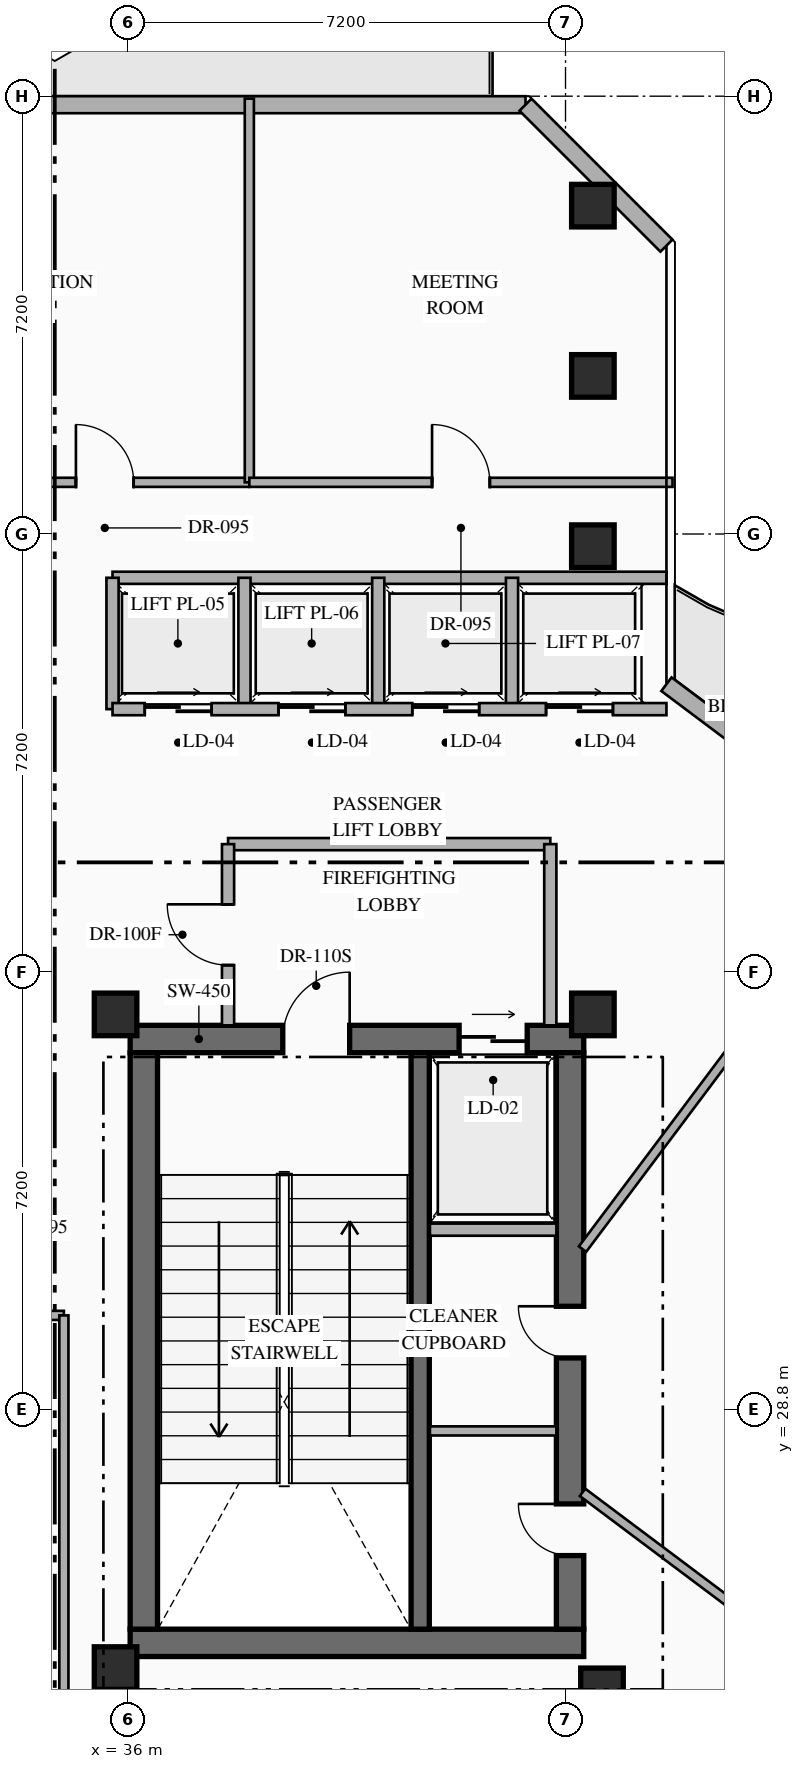
"""IFC4 building model, lengths in metres.
Left out: names, types, materials, properties, quantities, classifications, styles, units other than length and angle.
Written with IfcOpenShell. Run it as: python <this file> out.ifc"""

import sys

from ifc_helpers import new_model, si_unit, direction, frame, frame_2d, origin, origin_2d, place, context, subcontext, project, spatial, rectangle, hollow_rectangle, extrude, element, fill, save


model = new_model("IFC4")
c1 = context("Model", 3, precision=1e-05, world=origin(), true_north=direction((0.0, 1.0)))
c2 = subcontext(c1, "Body", "Model", "MODEL_VIEW")
j1 = project(units=[si_unit("LENGTHUNIT", "METRE"), si_unit("PLANEANGLEUNIT", "RADIAN")], contexts=[c1])
p1 = place(None, origin())
s1 = spatial("IfcSite", under=j1, at=p1, CompositionType="ELEMENT")
p2 = place(p1, origin())
s2 = spatial("IfcBuilding", under=s1, at=p2, CompositionType="ELEMENT")
p3 = place(p2, frame((0.0, 0.0, 234.75)))
s3 = spatial("IfcBuildingStorey", under=s2, at=p3, CompositionType="ELEMENT", Elevation=234.75)
p4 = place(p3, frame((36.04, 24.965, 0.0), z_axis=(0.0, 0.0, 1.0), x_axis=(1.0, 0.0, 0.0)))
e1 = element("IfcWall", 1, at=p4, inside=s3, PredefinedType="SHEAR", context=c2, shape_type="SweptSolid", body=[
    extrude(rectangle(XDim=7.46, YDim=0.45, at=frame_2d((3.73, 0.0))), origin(), (0.0, 0.0, 1.0), 4.8),
])
p5 = place(p3, frame((36.04, 34.895, 0.0), z_axis=(0.0, 0.0, 1.0), x_axis=(1.0, 0.0, 0.0)))
e2 = element("IfcWall", 2, at=p5, inside=s3, PredefinedType="SHEAR", context=c2, shape_type="SweptSolid", body=[
    extrude(rectangle(XDim=7.46, YDim=0.45, at=frame_2d((3.73, 0.0))), origin(), (0.0, 0.0, 1.0), 4.8),
])
p6 = place(p5, frame((2.51, 0.0, 0.0)))
e3 = element("IfcOpeningElement", 3, at=p6, cuts=e2, PredefinedType="OPENING", context=c2, shape_type="SweptSolid", body=[
    extrude(rectangle(XDim=1.1, YDim=2.2, at=frame_2d((0.55, 1.1))), frame((0.0, 0.235, 0.0), z_axis=(0.0, -1.0, 0.0), x_axis=(1.0, 0.0, 0.0)), (0.0, 0.0, 1.0), 0.47),
])
p7 = place(p5, frame((5.41, 0.0, 0.0)))
e4 = element("IfcOpeningElement", 4, at=p7, cuts=e2, PredefinedType="OPENING", context=c2, shape_type="SweptSolid", body=[
    extrude(rectangle(XDim=1.12, YDim=2.15, at=frame_2d((0.56, 1.075))), frame((0.0, 0.235, 0.0), z_axis=(0.0, -1.0, 0.0), x_axis=(1.0, 0.0, 0.0)), (0.0, 0.0, 1.0), 0.47),
])
p8 = place(p3, frame((36.265, 25.19, 0.0), z_axis=(0.0, 0.0, 1.0), x_axis=(0.0, 1.0, 0.0)))
e5 = element("IfcWall", 5, at=p8, inside=s3, PredefinedType="SHEAR", context=c2, shape_type="SweptSolid", body=[
    extrude(rectangle(XDim=9.48, YDim=0.45, at=frame_2d((4.74, 0.0))), origin(), (0.0, 0.0, 1.0), 4.8),
])
p9 = place(p3, frame((43.275, 25.19, 0.0), z_axis=(0.0, 0.0, 1.0), x_axis=(0.0, 1.0, 0.0)))
e6 = element("IfcWall", 6, at=p9, inside=s3, PredefinedType="SHEAR", context=c2, shape_type="SweptSolid", body=[
    extrude(rectangle(XDim=9.48, YDim=0.45, at=frame_2d((4.74, 0.0))), origin(), (0.0, 0.0, 1.0), 4.8),
])
p10 = place(p9, frame((1.21, 0.0, 0.0)))
e7 = element("IfcOpeningElement", 7, at=p10, cuts=e6, PredefinedType="OPENING", context=c2, shape_type="SweptSolid", body=[
    extrude(rectangle(XDim=0.85, YDim=2.08, at=frame_2d((0.425, 1.04))), frame((0.0, 0.235, 0.0), z_axis=(0.0, -1.0, 0.0), x_axis=(1.0, 0.0, 0.0)), (0.0, 0.0, 1.0), 0.47),
])
p11 = place(p9, frame((4.46, 0.0, 0.0)))
e8 = element("IfcOpeningElement", 8, at=p11, cuts=e6, PredefinedType="OPENING", context=c2, shape_type="SweptSolid", body=[
    extrude(rectangle(XDim=0.85, YDim=2.08, at=frame_2d((0.425, 1.04))), frame((0.0, 0.235, 0.0), z_axis=(0.0, -1.0, 0.0), x_axis=(1.0, 0.0, 0.0)), (0.0, 0.0, 1.0), 0.47),
])
p12 = place(p3, frame((40.81, 25.19, 0.0), z_axis=(0.0, 0.0, 1.0), x_axis=(0.0, 1.0, 0.0)))
e9 = element("IfcWall", 9, at=p12, inside=s3, PredefinedType="SHEAR", context=c2, shape_type="SweptSolid", body=[
    extrude(rectangle(XDim=9.48, YDim=0.3, at=frame_2d((4.74, 0.0))), origin(), (0.0, 0.0, 1.0), 4.8),
])
for number, where, z_axis, x_axis in (
    (10, (35.8, 24.55, 0.0), (0.0, 0.0, 1.0), (1.0, 0.0, 0.0)),
    (11, (43.8, 24.2, 0.0), (0.0, 0.0, 1.0), (1.0, 0.0, 0.0)),
    (12, (35.8, 35.3, 0.0), (0.0, 0.0, 1.0), (1.0, 0.0, 0.0)),
    (13, (43.65, 35.3, 0.0), (0.0, 0.0, 1.0), (1.0, 0.0, 0.0)),
    (14, (43.65, 43.0, 0.0), (0.0, 0.0, 1.0), (1.0, 0.0, 0.0)),
    (15, (43.65, 45.8, 0.0), (0.0, 0.0, 1.0), (1.0, 0.0, 0.0)),
    (16, (43.65, 48.6, 0.0), (0.0, 0.0, 1.0), (1.0, 0.0, 0.0)),
):
    element("IfcColumn", number, at=place(p3, frame(where, z_axis=z_axis, x_axis=x_axis)), inside=s3, PredefinedType="COLUMN", context=c2, shape_type="SweptSolid", body=[
        extrude(hollow_rectangle(XDim=0.7, YDim=0.7, WallThickness=0.028, at=origin_2d()), origin(), (0.0, 0.0, 1.0), 4.8),
    ])
p13 = place(p3, frame((44.86, 40.73, 0.0), z_axis=(0.0, 0.0, 1.0), x_axis=(0.800022950109, -0.599969398635, 0.0)))
e17 = element("IfcWall", 17, at=p13, inside=s3, PredefinedType="STANDARD", context=c2, shape_type="SweptSolid", body=[
    extrude(rectangle(XDim=10.212, YDim=0.28, at=frame_2d((5.106, 0.0))), origin(), (0.0, 0.0, 1.0), 4.55),
])
p14 = place(p13, frame((1.901, 0.0, 0.0)))
e18 = element("IfcOpeningElement", 18, at=p14, cuts=e17, PredefinedType="OPENING", context=c2, shape_type="SweptSolid", body=[
    extrude(rectangle(XDim=1.1, YDim=2.2, at=frame_2d((0.55, 1.1))), frame((0.0, 0.15, 0.0), z_axis=(0.0, -1.0, 0.0), x_axis=(1.0, 0.0, 0.0)), (0.0, 0.0, 1.0), 0.3),
])
p15 = place(p3, frame((53.493, 31.358, 0.0), z_axis=(0.0, 0.0, 1.0), x_axis=(-0.599970072971, -0.800022444397, 0.0)))
e19 = element("IfcWall", 19, at=p15, inside=s3, PredefinedType="STANDARD", context=c2, shape_type="SweptSolid", body=[
    extrude(rectangle(XDim=20.885, YDim=0.28, at=frame_2d((10.442, 0.0))), origin(), (0.0, 0.0, 1.0), 4.55),
])
p16 = place(p15, frame((16.181, 0.0, 0.0)))
e20 = element("IfcOpeningElement", 20, at=p16, cuts=e19, PredefinedType="OPENING", context=c2, shape_type="SweptSolid", body=[
    extrude(rectangle(XDim=1.8, YDim=2.25, at=frame_2d((0.9, 1.125))), frame((0.0, 0.15, 0.0), z_axis=(0.0, -1.0, 0.0), x_axis=(1.0, 0.0, 0.0)), (0.0, 0.0, 1.0), 0.3),
])
p17 = place(p15, frame((1.456, 0.0, 0.75)))
e21 = element("IfcOpeningElement", 21, at=p17, cuts=e19, PredefinedType="OPENING", context=c2, shape_type="SweptSolid", body=[
    extrude(rectangle(XDim=2.1, YDim=2.2, at=frame_2d((1.05, 1.1))), frame((0.0, 0.15, 0.0), z_axis=(0.0, -1.0, 0.0), x_axis=(1.0, 0.0, 0.0)), (0.0, 0.0, 1.0), 0.3),
])
p18 = place(p3, frame((20.458, 50.26, 0.0), z_axis=(0.0, 0.0, 1.0), x_axis=(1.0, 0.0, 0.0)))
e22 = element("IfcWall", 22, at=p18, inside=s3, PredefinedType="STANDARD", context=c2, shape_type="SweptSolid", body=[
    extrude(rectangle(XDim=22.084, YDim=0.28, at=frame_2d((11.042, 0.0))), origin(), (0.0, 0.0, 1.0), 4.55),
])
p19 = place(p18, frame((2.1, 0.0, 0.0)))
e23 = element("IfcOpeningElement", 23, at=p19, cuts=e22, PredefinedType="OPENING", context=c2, shape_type="SweptSolid", body=[
    extrude(rectangle(XDim=1.1, YDim=2.2, at=frame_2d((0.55, 1.1))), frame((0.0, 0.15, 0.0), z_axis=(0.0, -1.0, 0.0), x_axis=(1.0, 0.0, 0.0)), (0.0, 0.0, 1.0), 0.3),
])
p20 = place(p3, frame((42.542, 50.26, 0.0), z_axis=(0.0, 0.0, 1.0), x_axis=(0.707106781187, -0.707106781187, 0.0)))
e24 = element("IfcWall", 24, at=p20, inside=s3, PredefinedType="STANDARD", context=c2, shape_type="SweptSolid", body=[
    extrude(rectangle(XDim=3.278, YDim=0.28, at=frame_2d((1.639, 0.0))), origin(), (0.0, 0.0, 1.0), 4.55),
])
p21 = place(p3, frame((40.97, 31.76, 0.0), z_axis=(0.0, 0.0, 1.0), x_axis=(1.0, 0.0, 0.0)))
e25 = element("IfcWall", 25, at=p21, inside=s3, PredefinedType="STANDARD", context=c2, shape_type="SweptSolid", body=[
    extrude(rectangle(XDim=2.08, YDim=0.2, at=frame_2d((1.04, 0.0))), origin(), (0.0, 0.0, 1.0), 4.55),
])
p22 = place(p3, frame((40.97, 28.45, 0.0), z_axis=(0.0, 0.0, 1.0), x_axis=(1.0, 0.0, 0.0)))
e26 = element("IfcWall", 26, at=p22, inside=s3, PredefinedType="PARTITIONING", context=c2, shape_type="SweptSolid", body=[
    extrude(rectangle(XDim=2.08, YDim=0.15, at=frame_2d((1.04, 0.0))), origin(), (0.0, 0.0, 1.0), 4.55),
])
p23 = place(p3, frame((37.65, 38.1, 0.0), z_axis=(0.0, 0.0, 1.0), x_axis=(1.0, 0.0, 0.0)))
e27 = element("IfcWall", 27, at=p23, inside=s3, PredefinedType="STANDARD", context=c2, shape_type="SweptSolid", body=[
    extrude(rectangle(XDim=5.3, YDim=0.2, at=frame_2d((2.65, 0.0))), origin(), (0.0, 0.0, 1.0), 4.55),
])
p24 = place(p3, frame((42.95, 35.12, 0.0), z_axis=(0.0, 0.0, 1.0), x_axis=(0.0, 1.0, 0.0)))
e28 = element("IfcWall", 28, at=p24, inside=s3, PredefinedType="STANDARD", context=c2, shape_type="SweptSolid", body=[
    extrude(rectangle(XDim=2.98, YDim=0.2, at=frame_2d((1.49, 0.0))), origin(), (0.0, 0.0, 1.0), 4.55),
])
p25 = place(p3, frame((37.65, 35.12, 0.0), z_axis=(0.0, 0.0, 1.0), x_axis=(0.0, 1.0, 0.0)))
e29 = element("IfcWall", 29, at=p25, inside=s3, PredefinedType="STANDARD", context=c2, shape_type="SweptSolid", body=[
    extrude(rectangle(XDim=2.98, YDim=0.2, at=frame_2d((1.49, 0.0))), origin(), (0.0, 0.0, 1.0), 4.55),
])
p26 = place(p25, frame((0.99, 0.0, 0.0)))
e30 = element("IfcOpeningElement", 30, at=p26, cuts=e29, PredefinedType="OPENING", context=c2, shape_type="SweptSolid", body=[
    extrude(rectangle(XDim=1.0, YDim=2.2, at=frame_2d((0.5, 1.1))), frame((0.0, 0.11, 0.0), z_axis=(0.0, -1.0, 0.0), x_axis=(1.0, 0.0, 0.0)), (0.0, 0.0, 1.0), 0.22),
])
p27 = place(p3, frame((35.75, 42.48, 0.0), z_axis=(0.0, 0.0, 1.0), x_axis=(1.0, 0.0, 0.0)))
e31 = element("IfcWall", 31, at=p27, inside=s3, PredefinedType="STANDARD", context=c2, shape_type="SweptSolid", body=[
    extrude(rectangle(XDim=9.11, YDim=0.2, at=frame_2d((4.555, 0.0))), origin(), (0.0, 0.0, 1.0), 4.55),
])
for number, where, z_axis, x_axis in (
    (32, (35.75, 40.32, 0.0), (0.0, 0.0, 1.0), (0.0, 1.0, 0.0)),
    (33, (37.92, 40.32, 0.0), (0.0, 0.0, 1.0), (0.0, 1.0, 0.0)),
    (34, (40.12, 40.32, 0.0), (0.0, 0.0, 1.0), (0.0, 1.0, 0.0)),
    (35, (42.32, 40.32, 0.0), (0.0, 0.0, 1.0), (0.0, 1.0, 0.0)),
):
    element("IfcWall", number, at=place(p3, frame(where, z_axis=z_axis, x_axis=x_axis)), inside=s3, PredefinedType="STANDARD", context=c2, shape_type="SweptSolid", body=[
        extrude(rectangle(XDim=2.16, YDim=0.2, at=frame_2d((1.08, 0.0))), origin(), (0.0, 0.0, 1.0), 4.55),
    ])
p28 = place(p3, frame((35.75, 40.32, 0.0), z_axis=(0.0, 0.0, 1.0), x_axis=(1.0, 0.0, 0.0)))
e36 = element("IfcWall", 36, at=p28, inside=s3, PredefinedType="STANDARD", context=c2, shape_type="SweptSolid", body=[
    extrude(rectangle(XDim=9.11, YDim=0.2, at=frame_2d((4.555, 0.0))), origin(), (0.0, 0.0, 1.0), 4.55),
])
p29 = place(p28, frame((0.53, 0.0, 0.0)))
e37 = element("IfcOpeningElement", 37, at=p29, cuts=e36, PredefinedType="OPENING", context=c2, shape_type="SweptSolid", body=[
    extrude(rectangle(XDim=1.1, YDim=2.18, at=frame_2d((0.55, 1.09))), frame((0.0, 0.11, 0.0), z_axis=(0.0, -1.0, 0.0), x_axis=(1.0, 0.0, 0.0)), (0.0, 0.0, 1.0), 0.22),
])
p30 = place(p28, frame((2.73, 0.0, 0.0)))
e38 = element("IfcOpeningElement", 38, at=p30, cuts=e36, PredefinedType="OPENING", context=c2, shape_type="SweptSolid", body=[
    extrude(rectangle(XDim=1.1, YDim=2.18, at=frame_2d((0.55, 1.09))), frame((0.0, 0.11, 0.0), z_axis=(0.0, -1.0, 0.0), x_axis=(1.0, 0.0, 0.0)), (0.0, 0.0, 1.0), 0.22),
])
p31 = place(p28, frame((4.93, 0.0, 0.0)))
e39 = element("IfcOpeningElement", 39, at=p31, cuts=e36, PredefinedType="OPENING", context=c2, shape_type="SweptSolid", body=[
    extrude(rectangle(XDim=1.1, YDim=2.18, at=frame_2d((0.55, 1.09))), frame((0.0, 0.11, 0.0), z_axis=(0.0, -1.0, 0.0), x_axis=(1.0, 0.0, 0.0)), (0.0, 0.0, 1.0), 0.22),
])
p32 = place(p28, frame((7.13, 0.0, 0.0)))
e40 = element("IfcOpeningElement", 40, at=p32, cuts=e36, PredefinedType="OPENING", context=c2, shape_type="SweptSolid", body=[
    extrude(rectangle(XDim=1.1, YDim=2.18, at=frame_2d((0.55, 1.09))), frame((0.0, 0.11, 0.0), z_axis=(0.0, -1.0, 0.0), x_axis=(1.0, 0.0, 0.0)), (0.0, 0.0, 1.0), 0.22),
])
p33 = place(p3, frame((30.5, 30.35, 0.0), z_axis=(0.0, 0.0, 1.0), x_axis=(1.0, 0.0, 0.0)))
e41 = element("IfcWall", 41, at=p33, inside=s3, PredefinedType="PARTITIONING", context=c2, shape_type="SweptSolid", body=[
    extrude(rectangle(XDim=4.45, YDim=0.15, at=frame_2d((2.225, 0.0))), origin(), (0.0, 0.0, 1.0), 4.55),
])
p34 = place(p33, frame((2.846, 0.0, 0.0)))
e42 = element("IfcOpeningElement", 42, at=p34, cuts=e41, PredefinedType="OPENING", context=c2, shape_type="SweptSolid", body=[
    extrude(rectangle(XDim=0.95, YDim=2.15, at=frame_2d((0.475, 1.075))), frame((0.0, 0.085, 0.0), z_axis=(0.0, -1.0, 0.0), x_axis=(1.0, 0.0, 0.0)), (0.0, 0.0, 1.0), 0.17),
])
p35 = place(p3, frame((34.95, 23.2, 0.0), z_axis=(0.0, 0.0, 1.0), x_axis=(0.0, 1.0, 0.0)))
e43 = element("IfcWall", 43, at=p35, inside=s3, PredefinedType="PARTITIONING", context=c2, shape_type="SweptSolid", body=[
    extrude(rectangle(XDim=7.15, YDim=0.15, at=frame_2d((3.575, 0.0))), origin(), (0.0, 0.0, 1.0), 4.55),
])
p36 = place(p3, frame((30.2, 44.05, 0.0), z_axis=(0.0, 0.0, 1.0), x_axis=(1.0, 0.0, 0.0)))
e44 = element("IfcWall", 44, at=p36, inside=s3, PredefinedType="PARTITIONING", context=c2, shape_type="SweptSolid", body=[
    extrude(rectangle(XDim=7.8, YDim=0.15, at=frame_2d((3.9, 0.0))), origin(), (0.0, 0.0, 1.0), 4.55),
])
p37 = place(p36, frame((4.948, 0.0, 0.0)))
e45 = element("IfcOpeningElement", 45, at=p37, cuts=e44, PredefinedType="OPENING", context=c2, shape_type="SweptSolid", body=[
    extrude(rectangle(XDim=0.95, YDim=2.15, at=frame_2d((0.475, 1.075))), frame((0.0, 0.085, 0.0), z_axis=(0.0, -1.0, 0.0), x_axis=(1.0, 0.0, 0.0)), (0.0, 0.0, 1.0), 0.17),
])
p38 = place(p3, frame((38.0, 44.05, 0.0), z_axis=(0.0, 0.0, 1.0), x_axis=(0.0, 1.0, 0.0)))
e46 = element("IfcWall", 46, at=p38, inside=s3, PredefinedType="PARTITIONING", context=c2, shape_type="SweptSolid", body=[
    extrude(rectangle(XDim=6.31, YDim=0.15, at=frame_2d((3.155, 0.0))), origin(), (0.0, 0.0, 1.0), 4.55),
])
p39 = place(p3, frame((38.0, 44.05, 0.0), z_axis=(0.0, 0.0, 1.0), x_axis=(1.0, 0.0, 0.0)))
e47 = element("IfcWall", 47, at=p39, inside=s3, PredefinedType="PARTITIONING", context=c2, shape_type="SweptSolid", body=[
    extrude(rectangle(XDim=6.96, YDim=0.15, at=frame_2d((3.48, 0.0))), origin(), (0.0, 0.0, 1.0), 4.55),
])
p40 = place(p39, frame((3.005, 0.0, 0.0)))
e48 = element("IfcOpeningElement", 48, at=p40, cuts=e47, PredefinedType="OPENING", context=c2, shape_type="SweptSolid", body=[
    extrude(rectangle(XDim=0.95, YDim=2.15, at=frame_2d((0.475, 1.075))), frame((0.0, 0.085, 0.0), z_axis=(0.0, -1.0, 0.0), x_axis=(1.0, 0.0, 0.0)), (0.0, 0.0, 1.0), 0.17),
])
p41 = place(p3, frame((43.48, 27.44, 0.0), z_axis=(0.0, 0.0, 1.0), x_axis=(0.79998982729, -0.600013563374, 0.0)))
e49 = element("IfcWall", 49, at=p41, inside=s3, PredefinedType="PARTITIONING", context=c2, shape_type="SweptSolid", body=[
    extrude(rectangle(XDim=5.76, YDim=0.15, at=frame_2d((2.88, 0.0))), origin(), (0.0, 0.0, 1.0), 4.55),
])
p42 = place(p3, frame((43.48, 31.44, 0.0), z_axis=(0.0, 0.0, 1.0), x_axis=(0.600009344989, 0.799992991173, 0.0)))
e50 = element("IfcWall", 50, at=p42, inside=s3, PredefinedType="PARTITIONING", context=c2, shape_type="SweptSolid", body=[
    extrude(rectangle(XDim=8.36, YDim=0.15, at=frame_2d((4.18, 0.0))), origin(), (0.0, 0.0, 1.0), 4.55),
])
p43 = place(p42, frame((4.703, 0.0, 0.0)))
e51 = element("IfcOpeningElement", 51, at=p43, cuts=e50, PredefinedType="OPENING", context=c2, shape_type="SweptSolid", body=[
    extrude(rectangle(XDim=0.95, YDim=2.15, at=frame_2d((0.475, 1.075))), frame((0.0, 0.085, 0.0), z_axis=(0.0, -1.0, 0.0), x_axis=(1.0, 0.0, 0.0)), (0.0, 0.0, 1.0), 0.17),
])
p44 = place(p3, frame((27.91, 26.68, 0.0), z_axis=(0.0, 0.0, 1.0), x_axis=(0.8, -0.6, 0.0)))
e52 = element("IfcWall", 52, at=p44, inside=s3, PredefinedType="PARTITIONING", context=c2, shape_type="SweptSolid", body=[
    extrude(rectangle(XDim=17.76, YDim=0.15, at=frame_2d((8.88, 0.0))), origin(), (0.0, 0.0, 1.0), 4.55),
])
p45 = place(p44, frame((14.986, 0.0, 0.0)))
e53 = element("IfcOpeningElement", 53, at=p45, cuts=e52, PredefinedType="OPENING", context=c2, shape_type="SweptSolid", body=[
    extrude(rectangle(XDim=0.95, YDim=2.15, at=frame_2d((0.475, 1.075))), frame((0.0, 0.085, 0.0), z_axis=(0.0, -1.0, 0.0), x_axis=(1.0, 0.0, 0.0)), (0.0, 0.0, 1.0), 0.17),
])
p46 = place(p6, origin())
e54 = element("IfcDoor", 54, at=p46, inside=s3, OperationType="SINGLE_SWING_RIGHT", PredefinedType="DOOR", context=c2, shape_type="SweptSolid", body=[
    extrude(rectangle(XDim=1.1, YDim=2.2, at=frame_2d((0.55, 1.1))), frame((0.0, 0.025, 0.0), z_axis=(0.0, -1.0, 0.0), x_axis=(1.0, 0.0, 0.0)), (0.0, 0.0, 1.0), 0.05),
])
fill(e3, e54)
p47 = place(p7, origin())
e55 = element("IfcDoor", 55, at=p47, inside=s3, OperationType="SLIDING_TO_RIGHT", PredefinedType="USERDEFINED", context=c2, shape_type="SweptSolid", body=[
    extrude(rectangle(XDim=1.12, YDim=2.15, at=frame_2d((0.56, 1.075))), frame((0.0, 0.025, 0.0), z_axis=(0.0, -1.0, 0.0), x_axis=(1.0, 0.0, 0.0)), (0.0, 0.0, 1.0), 0.05),
])
fill(e4, e55)
p48 = place(p10, origin())
e56 = element("IfcDoor", 56, at=p48, inside=s3, OperationType="SINGLE_SWING_RIGHT", PredefinedType="DOOR", context=c2, shape_type="SweptSolid", body=[
    extrude(rectangle(XDim=0.85, YDim=2.08, at=frame_2d((0.425, 1.04))), frame((0.0, 0.025, 0.0), z_axis=(0.0, -1.0, 0.0), x_axis=(1.0, 0.0, 0.0)), (0.0, 0.0, 1.0), 0.05),
])
fill(e7, e56)
p49 = place(p11, origin())
e57 = element("IfcDoor", 57, at=p49, inside=s3, OperationType="SINGLE_SWING_RIGHT", PredefinedType="DOOR", context=c2, shape_type="SweptSolid", body=[
    extrude(rectangle(XDim=0.85, YDim=2.08, at=frame_2d((0.425, 1.04))), frame((0.0, 0.025, 0.0), z_axis=(0.0, -1.0, 0.0), x_axis=(1.0, 0.0, 0.0)), (0.0, 0.0, 1.0), 0.05),
])
fill(e8, e57)
p50 = place(p26, origin())
e58 = element("IfcDoor", 58, at=p50, inside=s3, OperationType="SINGLE_SWING_RIGHT", PredefinedType="DOOR", context=c2, shape_type="SweptSolid", body=[
    extrude(rectangle(XDim=1.0, YDim=2.2, at=frame_2d((0.5, 1.1))), frame((0.0, 0.025, 0.0), z_axis=(0.0, -1.0, 0.0), x_axis=(1.0, 0.0, 0.0)), (0.0, 0.0, 1.0), 0.05),
])
fill(e30, e58)
p51 = place(p29, origin())
e59 = element("IfcDoor", 59, at=p51, inside=s3, OperationType="SLIDING_TO_RIGHT", PredefinedType="USERDEFINED", context=c2, shape_type="SweptSolid", body=[
    extrude(rectangle(XDim=1.1, YDim=2.18, at=frame_2d((0.55, 1.09))), frame((0.0, 0.025, 0.0), z_axis=(0.0, -1.0, 0.0), x_axis=(1.0, 0.0, 0.0)), (0.0, 0.0, 1.0), 0.05),
])
fill(e37, e59)
p52 = place(p30, origin())
e60 = element("IfcDoor", 60, at=p52, inside=s3, OperationType="SLIDING_TO_RIGHT", PredefinedType="USERDEFINED", context=c2, shape_type="SweptSolid", body=[
    extrude(rectangle(XDim=1.1, YDim=2.18, at=frame_2d((0.55, 1.09))), frame((0.0, 0.025, 0.0), z_axis=(0.0, -1.0, 0.0), x_axis=(1.0, 0.0, 0.0)), (0.0, 0.0, 1.0), 0.05),
])
fill(e38, e60)
p53 = place(p31, origin())
e61 = element("IfcDoor", 61, at=p53, inside=s3, OperationType="SLIDING_TO_RIGHT", PredefinedType="USERDEFINED", context=c2, shape_type="SweptSolid", body=[
    extrude(rectangle(XDim=1.1, YDim=2.18, at=frame_2d((0.55, 1.09))), frame((0.0, 0.025, 0.0), z_axis=(0.0, -1.0, 0.0), x_axis=(1.0, 0.0, 0.0)), (0.0, 0.0, 1.0), 0.05),
])
fill(e39, e61)
p54 = place(p32, origin())
e62 = element("IfcDoor", 62, at=p54, inside=s3, OperationType="SLIDING_TO_RIGHT", PredefinedType="USERDEFINED", context=c2, shape_type="SweptSolid", body=[
    extrude(rectangle(XDim=1.1, YDim=2.18, at=frame_2d((0.55, 1.09))), frame((0.0, 0.025, 0.0), z_axis=(0.0, -1.0, 0.0), x_axis=(1.0, 0.0, 0.0)), (0.0, 0.0, 1.0), 0.05),
])
fill(e40, e62)
p55 = place(p37, origin())
e63 = element("IfcDoor", 63, at=p55, inside=s3, OperationType="SINGLE_SWING_LEFT", PredefinedType="DOOR", context=c2, shape_type="SweptSolid", body=[
    extrude(rectangle(XDim=0.95, YDim=2.15, at=frame_2d((0.475, 1.075))), frame((0.0, 0.025, 0.0), z_axis=(0.0, -1.0, 0.0), x_axis=(1.0, 0.0, 0.0)), (0.0, 0.0, 1.0), 0.05),
])
fill(e45, e63)
p56 = place(p40, origin())
e64 = element("IfcDoor", 64, at=p56, inside=s3, OperationType="SINGLE_SWING_LEFT", PredefinedType="DOOR", context=c2, shape_type="SweptSolid", body=[
    extrude(rectangle(XDim=0.95, YDim=2.15, at=frame_2d((0.475, 1.075))), frame((0.0, 0.025, 0.0), z_axis=(0.0, -1.0, 0.0), x_axis=(1.0, 0.0, 0.0)), (0.0, 0.0, 1.0), 0.05),
])
fill(e48, e64)
save(model, sys.argv[1])
